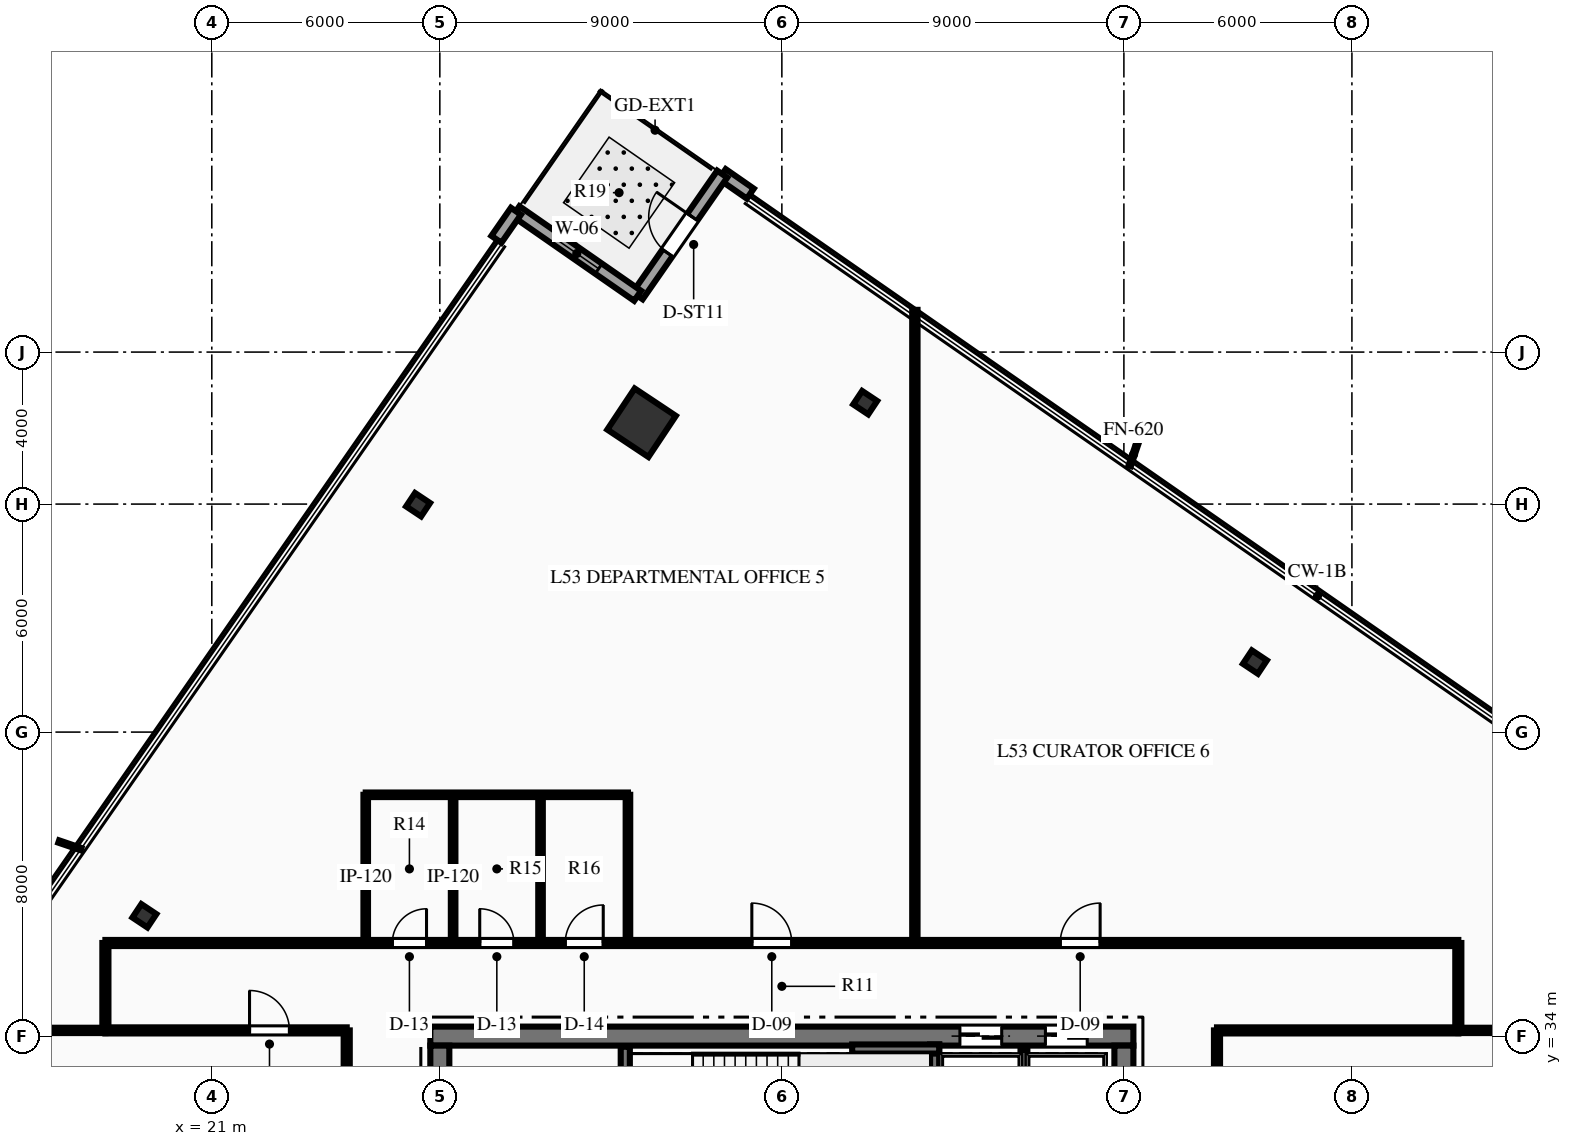
"""IFC4 building model, lengths in metres.
Left out: names, types, materials, properties, quantities, classifications, styles, units other than length and angle.
Written with IfcOpenShell. Run it as: python <this file> out.ifc"""

import sys

from ifc_helpers import new_model, si_unit, direction, frame, frame_2d, origin, origin_2d, place, context, subcontext, project, spatial, rectangle, hollow_rectangle, i_section, extrude, element, fill, save


model = new_model("IFC4")
c1 = context("Model", 3, precision=1e-05, world=origin(), true_north=direction((0.0, 1.0)))
c2 = subcontext(c1, "Body", "Model", "MODEL_VIEW")
j1 = project(units=[si_unit("LENGTHUNIT", "METRE"), si_unit("PLANEANGLEUNIT", "RADIAN")], contexts=[c1])
p1 = place(None, origin())
s1 = spatial("IfcSite", under=j1, at=p1, CompositionType="ELEMENT")
p2 = place(p1, origin())
s2 = spatial("IfcBuilding", under=s1, at=p2, CompositionType="ELEMENT")
p3 = place(p2, frame((0.0, 0.0, 213.45)))
s3 = spatial("IfcBuildingStorey", under=s2, at=p3, CompositionType="ELEMENT", Elevation=213.45)
p4 = place(p3, frame((26.75, 34.0, 0.0), z_axis=(0.0, 0.0, 1.0), x_axis=(1.0, 0.0, 0.0)))
e1 = element("IfcWall", 1, at=p4, inside=s3, PredefinedType="SHEAR", context=c2, shape_type="SweptSolid", body=[
    extrude(rectangle(XDim=18.5, YDim=0.5, at=frame_2d((9.25, 0.0))), origin(), (0.0, 0.0, 1.0), 3.75),
])
p5 = place(p4, frame((13.935, 0.0, 0.0)))
e2 = element("IfcOpeningElement", 2, at=p5, cuts=e1, PredefinedType="OPENING", context=c2, shape_type="SweptSolid", body=[
    extrude(rectangle(XDim=1.1, YDim=2.15, at=frame_2d((0.55, 1.075))), frame((0.0, 0.26, 0.0), z_axis=(0.0, -1.0, 0.0), x_axis=(1.0, 0.0, 0.0)), (0.0, 0.0, 1.0), 0.52),
])
p6 = place(p4, frame((16.185, 0.0, 0.0)))
e3 = element("IfcOpeningElement", 3, at=p6, cuts=e1, PredefinedType="OPENING", context=c2, shape_type="SweptSolid", body=[
    extrude(rectangle(XDim=1.1, YDim=2.15, at=frame_2d((0.55, 1.075))), frame((0.0, 0.26, 0.0), z_axis=(0.0, -1.0, 0.0), x_axis=(1.0, 0.0, 0.0)), (0.0, 0.0, 1.0), 0.52),
])
p7 = place(p3, frame((27.0, 18.25, 0.0), z_axis=(0.0, 0.0, 1.0), x_axis=(0.0, 1.0, 0.0)))
e4 = element("IfcWall", 4, at=p7, inside=s3, PredefinedType="SHEAR", context=c2, shape_type="SweptSolid", body=[
    extrude(rectangle(XDim=15.5, YDim=0.5, at=frame_2d((7.75, 0.0))), origin(), (0.0, 0.0, 1.0), 3.75),
])
p8 = place(p7, frame((9.99, 0.0, 0.0)))
e5 = element("IfcOpeningElement", 5, at=p8, cuts=e4, PredefinedType="OPENING", context=c2, shape_type="SweptSolid", body=[
    extrude(rectangle(XDim=1.4, YDim=2.2, at=frame_2d((0.7, 1.1))), frame((0.0, 0.26, 0.0), z_axis=(0.0, -1.0, 0.0), x_axis=(1.0, 0.0, 0.0)), (0.0, 0.0, 1.0), 0.52),
])
p9 = place(p3, frame((45.0, 18.25, 0.0), z_axis=(0.0, 0.0, 1.0), x_axis=(0.0, 1.0, 0.0)))
e6 = element("IfcWall", 6, at=p9, inside=s3, PredefinedType="SHEAR", context=c2, shape_type="SweptSolid", body=[
    extrude(rectangle(XDim=15.5, YDim=0.5, at=frame_2d((7.75, 0.0))), origin(), (0.0, 0.0, 1.0), 3.75),
])
p10 = place(p9, frame((9.99, 0.0, 0.0)))
e7 = element("IfcOpeningElement", 7, at=p10, cuts=e6, PredefinedType="OPENING", context=c2, shape_type="SweptSolid", body=[
    extrude(rectangle(XDim=1.4, YDim=2.2, at=frame_2d((0.7, 1.1))), frame((0.0, 0.26, 0.0), z_axis=(0.0, -1.0, 0.0), x_axis=(1.0, 0.0, 0.0)), (0.0, 0.0, 1.0), 0.52),
])
p11 = place(p3, frame((31.88, 29.93, 0.0), z_axis=(0.0, 0.0, 1.0), x_axis=(0.0, 1.0, 0.0)))
e8 = element("IfcWall", 8, at=p11, inside=s3, PredefinedType="SHEAR", context=c2, shape_type="SweptSolid", body=[
    extrude(rectangle(XDim=3.79, YDim=0.24, at=frame_2d((1.895, 0.0))), origin(), (0.0, 0.0, 1.0), 3.75),
])
p12 = place(p3, frame((40.02, 29.93, 0.0), z_axis=(0.0, 0.0, 1.0), x_axis=(0.0, 1.0, 0.0)))
e9 = element("IfcWall", 9, at=p12, inside=s3, PredefinedType="SHEAR", context=c2, shape_type="SweptSolid", body=[
    extrude(rectangle(XDim=3.85, YDim=0.24, at=frame_2d((1.925, 0.0))), origin(), (0.0, 0.0, 1.0), 3.75),
])
p13 = place(p3, frame((37.85, 33.66, 0.0), z_axis=(0.0, 0.0, 1.0), x_axis=(1.0, 0.0, 0.0)))
e10 = element("IfcWall", 10, at=p13, inside=s3, PredefinedType="SHEAR", context=c2, shape_type="SweptSolid", body=[
    extrude(rectangle(XDim=2.29, YDim=0.24, at=frame_2d((1.145, 0.0))), origin(), (0.0, 0.0, 1.0), 3.75),
])
p14 = place(p3, frame((32.308, 50.141, 0.0), z_axis=(0.0, 0.0, 1.0), x_axis=(0.554118199338, 0.832437998389, 0.0)))
e11 = element("IfcColumn", 11, at=p14, inside=s3, PredefinedType="COLUMN", context=c2, shape_type="SweptSolid", body=[
    extrude(hollow_rectangle(XDim=1.3, YDim=1.3, WallThickness=0.06, at=origin_2d()), origin(), (0.0, 0.0, 1.0), 3.75),
])
for number, where, z_axis, x_axis in (
    (12, (48.448, 43.842, 0.0), (0.0, 0.0, 1.0), (0.554, 0.832, 0.0)),
    (13, (38.193, 50.668, 0.0), (0.0, 0.0, 1.0), (0.554, 0.832, 0.0)),
    (14, (26.428, 47.984, 0.0), (0.0, 0.0, 1.0), (0.554, 0.832, 0.0)),
    (15, (19.226, 37.166, 0.0), (0.0, 0.0, 1.0), (0.554, 0.832, 0.0)),
):
    element("IfcColumn", number, at=place(p3, frame(where, z_axis=z_axis, x_axis=x_axis)), inside=s3, PredefinedType="COLUMN", context=c2, shape_type="SweptSolid", body=[
        extrude(i_section(OverallWidth=0.424, OverallDepth=0.474, WebThickness=0.048, FlangeThickness=0.077, at=origin_2d()), origin(), (0.0, 0.0, 1.0), 3.75),
    ])
p15 = place(p3, frame((34.431, 56.683, 0.0), z_axis=(0.0, 0.0, 1.0), x_axis=(0.821126300875, -0.570746526938, 0.0)))
e16 = element("IfcWall", 16, at=p15, inside=s3, PredefinedType="STANDARD", context=c2, shape_type="SweptSolid", body=[
    extrude(rectangle(XDim=0.9, YDim=0.32, at=frame_2d((0.45, 0.0))), origin(), (0.0, 0.0, 1.0), 3.47),
])
p16 = place(p3, frame((32.205, 53.481, 0.0), z_axis=(0.0, 0.0, 1.0), x_axis=(0.570690245506, 0.821165417979, 0.0)))
e17 = element("IfcWall", 17, at=p16, inside=s3, PredefinedType="STANDARD", context=c2, shape_type="SweptSolid", body=[
    extrude(rectangle(XDim=3.9, YDim=0.32, at=frame_2d((1.95, 0.0))), origin(), (0.0, 0.0, 1.0), 3.47),
])
p17 = place(p16, frame((1.375, 0.0, 0.0)))
e18 = element("IfcOpeningElement", 18, at=p17, cuts=e17, PredefinedType="OPENING", context=c2, shape_type="SweptSolid", body=[
    extrude(rectangle(XDim=1.15, YDim=2.2, at=frame_2d((0.575, 1.1))), frame((0.0, 0.17, 0.0), z_axis=(0.0, -1.0, 0.0), x_axis=(1.0, 0.0, 0.0)), (0.0, 0.0, 1.0), 0.34),
])
p18 = place(p3, frame((29.002, 55.707, 0.0), z_axis=(0.0, 0.0, 1.0), x_axis=(0.821185805459, -0.57066090887, 0.0)))
e19 = element("IfcWall", 19, at=p18, inside=s3, PredefinedType="STANDARD", context=c2, shape_type="SweptSolid", body=[
    extrude(rectangle(XDim=3.9, YDim=0.32, at=frame_2d((1.95, 0.0))), origin(), (0.0, 0.0, 1.0), 3.47),
])
p19 = place(p18, frame((1.25, 0.0, 0.85)))
e20 = element("IfcOpeningElement", 20, at=p19, cuts=e19, PredefinedType="OPENING", context=c2, shape_type="SweptSolid", body=[
    extrude(rectangle(XDim=1.4, YDim=2.0, at=frame_2d((0.7, 1.0))), frame((0.0, 0.17, 0.0), z_axis=(0.0, -1.0, 0.0), x_axis=(1.0, 0.0, 0.0)), (0.0, 0.0, 1.0), 0.34),
])
p20 = place(p3, frame((28.489, 54.968, 0.0), z_axis=(0.0, 0.0, 1.0), x_axis=(0.570563582873, 0.821253430982, 0.0)))
e21 = element("IfcWall", 21, at=p20, inside=s3, PredefinedType="STANDARD", context=c2, shape_type="SweptSolid", body=[
    extrude(rectangle(XDim=0.9, YDim=0.32, at=frame_2d((0.45, 0.0))), origin(), (0.0, 0.0, 1.0), 3.47),
])
p21 = place(p3, frame((42.37, 29.9, 0.0), z_axis=(0.0, 0.0, 1.0), x_axis=(0.0, 1.0, 0.0)))
e22 = element("IfcWall", 22, at=p21, inside=s3, PredefinedType="PARTITIONING", context=c2, shape_type="SweptSolid", body=[
    extrude(rectangle(XDim=3.75, YDim=0.18, at=frame_2d((1.875, 0.0))), origin(), (0.0, 0.0, 1.0), 3.47),
])
p22 = place(p3, frame((18.2, 36.45, 0.0), z_axis=(0.0, 0.0, 1.0), x_axis=(1.0, 0.0, 0.0)))
e23 = element("IfcWall", 23, at=p22, inside=s3, PredefinedType="PARTITIONING", context=c2, shape_type="SweptSolid", body=[
    extrude(rectangle(XDim=35.6, YDim=0.16, at=frame_2d((17.8, 0.0))), origin(), (0.0, 0.0, 1.0), 2.849),
])
p23 = place(p22, frame((7.55, 0.0, 0.0)))
e24 = element("IfcOpeningElement", 24, at=p23, cuts=e23, PredefinedType="OPENING", context=c2, shape_type="SweptSolid", body=[
    extrude(rectangle(XDim=0.9, YDim=2.15, at=frame_2d((0.45, 1.075))), frame((0.0, 0.09, 0.0), z_axis=(0.0, -1.0, 0.0), x_axis=(1.0, 0.0, 0.0)), (0.0, 0.0, 1.0), 0.18),
])
p24 = place(p22, frame((9.85, 0.0, 0.0)))
e25 = element("IfcOpeningElement", 25, at=p24, cuts=e23, PredefinedType="OPENING", context=c2, shape_type="SweptSolid", body=[
    extrude(rectangle(XDim=0.9, YDim=2.15, at=frame_2d((0.45, 1.075))), frame((0.0, 0.09, 0.0), z_axis=(0.0, -1.0, 0.0), x_axis=(1.0, 0.0, 0.0)), (0.0, 0.0, 1.0), 0.18),
])
p25 = place(p22, frame((12.1, 0.0, 0.0)))
e26 = element("IfcOpeningElement", 26, at=p25, cuts=e23, PredefinedType="OPENING", context=c2, shape_type="SweptSolid", body=[
    extrude(rectangle(XDim=1.0, YDim=2.15, at=frame_2d((0.5, 1.075))), frame((0.0, 0.09, 0.0), z_axis=(0.0, -1.0, 0.0), x_axis=(1.0, 0.0, 0.0)), (0.0, 0.0, 1.0), 0.18),
])
p26 = place(p22, frame((17.01, 0.0, 0.0)))
e27 = element("IfcOpeningElement", 27, at=p26, cuts=e23, PredefinedType="OPENING", context=c2, shape_type="SweptSolid", body=[
    extrude(rectangle(XDim=1.05, YDim=2.15, at=frame_2d((0.525, 1.075))), frame((0.0, 0.09, 0.0), z_axis=(0.0, -1.0, 0.0), x_axis=(1.0, 0.0, 0.0)), (0.0, 0.0, 1.0), 0.18),
])
p27 = place(p22, frame((25.125, 0.0, 0.0)))
e28 = element("IfcOpeningElement", 28, at=p27, cuts=e23, PredefinedType="OPENING", context=c2, shape_type="SweptSolid", body=[
    extrude(rectangle(XDim=1.05, YDim=2.15, at=frame_2d((0.525, 1.075))), frame((0.0, 0.09, 0.0), z_axis=(0.0, -1.0, 0.0), x_axis=(1.0, 0.0, 0.0)), (0.0, 0.0, 1.0), 0.18),
])
p28 = place(p3, frame((18.2, 34.15, 0.0), z_axis=(0.0, 0.0, 1.0), x_axis=(1.0, 0.0, 0.0)))
e29 = element("IfcWall", 29, at=p28, inside=s3, PredefinedType="PARTITIONING", context=c2, shape_type="SweptSolid", body=[
    extrude(rectangle(XDim=6.35, YDim=0.16, at=frame_2d((3.175, 0.0))), origin(), (0.0, 0.0, 1.0), 3.47),
])
p29 = place(p28, frame((3.793, 0.0, 0.0)))
e30 = element("IfcOpeningElement", 30, at=p29, cuts=e29, PredefinedType="OPENING", context=c2, shape_type="SweptSolid", body=[
    extrude(rectangle(XDim=1.05, YDim=2.15, at=frame_2d((0.525, 1.075))), frame((0.0, 0.09, 0.0), z_axis=(0.0, -1.0, 0.0), x_axis=(1.0, 0.0, 0.0)), (0.0, 0.0, 1.0), 0.18),
])
p30 = place(p3, frame((47.45, 34.15, 0.0), z_axis=(0.0, 0.0, 1.0), x_axis=(1.0, 0.0, 0.0)))
e31 = element("IfcWall", 31, at=p30, inside=s3, PredefinedType="PARTITIONING", context=c2, shape_type="SweptSolid", body=[
    extrude(rectangle(XDim=6.35, YDim=0.16, at=frame_2d((3.175, 0.0))), origin(), (0.0, 0.0, 1.0), 3.47),
])
p31 = place(p3, frame((24.55, 17.85, 0.0), z_axis=(0.0, 0.0, 1.0), x_axis=(0.0, 1.0, 0.0)))
e32 = element("IfcWall", 32, at=p31, inside=s3, PredefinedType="PARTITIONING", context=c2, shape_type="SweptSolid", body=[
    extrude(rectangle(XDim=16.3, YDim=0.16, at=frame_2d((8.15, 0.0))), origin(), (0.0, 0.0, 1.0), 3.47),
])
p32 = place(p31, frame((5.395, 0.0, 0.0)))
e33 = element("IfcOpeningElement", 33, at=p32, cuts=e32, PredefinedType="OPENING", context=c2, shape_type="SweptSolid", body=[
    extrude(rectangle(XDim=1.05, YDim=2.15, at=frame_2d((0.525, 1.075))), frame((0.0, 0.09, 0.0), z_axis=(0.0, -1.0, 0.0), x_axis=(1.0, 0.0, 0.0)), (0.0, 0.0, 1.0), 0.18),
])
p33 = place(p3, frame((47.45, 27.25, 0.0), z_axis=(0.0, 0.0, 1.0), x_axis=(0.0, 1.0, 0.0)))
e34 = element("IfcWall", 34, at=p33, inside=s3, PredefinedType="PARTITIONING", context=c2, shape_type="SweptSolid", body=[
    extrude(rectangle(XDim=6.9, YDim=0.16, at=frame_2d((3.45, 0.0))), origin(), (0.0, 0.0, 1.0), 3.47),
])
p34 = place(p33, frame((1.683, 0.0, 0.0)))
e35 = element("IfcOpeningElement", 35, at=p34, cuts=e34, PredefinedType="OPENING", context=c2, shape_type="SweptSolid", body=[
    extrude(rectangle(XDim=1.05, YDim=2.15, at=frame_2d((0.525, 1.075))), frame((0.0, 0.09, 0.0), z_axis=(0.0, -1.0, 0.0), x_axis=(1.0, 0.0, 0.0)), (0.0, 0.0, 1.0), 0.18),
])
for number, where, z_axis, x_axis in (
    (36, (18.2, 34.15, 0.0), (0.0, 0.0, 1.0), (0.0, 1.0, 0.0)),
    (37, (53.8, 34.15, 0.0), (0.0, 0.0, 1.0), (0.0, 1.0, 0.0)),
):
    element("IfcWall", number, at=place(p3, frame(where, z_axis=z_axis, x_axis=x_axis)), inside=s3, PredefinedType="PARTITIONING", context=c2, shape_type="SweptSolid", body=[
        extrude(rectangle(XDim=2.3, YDim=0.16, at=frame_2d((1.15, 0.0))), origin(), (0.0, 0.0, 1.0), 3.47),
    ])
for number, where, z_axis, x_axis in (
    (38, (25.05, 36.45, 0.0), (0.0, 0.0, 1.0), (0.0, 1.0, 0.0)),
    (39, (27.35, 36.45, 0.0), (0.0, 0.0, 1.0), (0.0, 1.0, 0.0)),
    (40, (29.65, 36.45, 0.0), (0.0, 0.0, 1.0), (0.0, 1.0, 0.0)),
):
    element("IfcWall", number, at=place(p3, frame(where, z_axis=z_axis, x_axis=x_axis)), inside=s3, PredefinedType="PARTITIONING", context=c2, shape_type="SweptSolid", body=[
        extrude(rectangle(XDim=3.9, YDim=0.12, at=frame_2d((1.95, 0.0))), origin(), (0.0, 0.0, 1.0), 3.47),
    ])
p35 = place(p3, frame((31.95, 36.45, 0.0), z_axis=(0.0, 0.0, 1.0), x_axis=(0.0, 1.0, 0.0)))
e41 = element("IfcWall", 41, at=p35, inside=s3, PredefinedType="PARTITIONING", context=c2, shape_type="SweptSolid", body=[
    extrude(rectangle(XDim=3.9, YDim=0.12, at=frame_2d((1.95, 0.0))), origin(), (0.0, 0.0, 1.0), 2.849),
])
p36 = place(p3, frame((25.05, 40.35, 0.0), z_axis=(0.0, 0.0, 1.0), x_axis=(1.0, 0.0, 0.0)))
e42 = element("IfcWall", 42, at=p36, inside=s3, PredefinedType="PARTITIONING", context=c2, shape_type="SweptSolid", body=[
    extrude(rectangle(XDim=6.9, YDim=0.12, at=frame_2d((3.45, 0.0))), origin(), (0.0, 0.0, 1.0), 3.47),
])
p37 = place(p3, frame((14.069, 34.15, 0.0), z_axis=(0.0, 0.0, 1.0), x_axis=(1.0, 0.0, 0.0)))
e43 = element("IfcWall", 43, at=p37, inside=s3, PredefinedType="PARTITIONING", context=c2, shape_type="SweptSolid", body=[
    extrude(rectangle(XDim=4.131, YDim=0.14, at=frame_2d((2.065, 0.0))), origin(), (0.0, 0.0, 1.0), 3.47),
])
p38 = place(p3, frame((53.8, 34.15, 0.0), z_axis=(0.0, 0.0, 1.0), x_axis=(1.0, 0.0, 0.0)))
e44 = element("IfcWall", 44, at=p38, inside=s3, PredefinedType="PARTITIONING", context=c2, shape_type="SweptSolid", body=[
    extrude(rectangle(XDim=11.685, YDim=0.14, at=frame_2d((5.842, 0.0))), origin(), (0.0, 0.0, 1.0), 3.47),
])
p39 = place(p3, frame((39.5, 36.45, 0.0), z_axis=(0.0, 0.0, 1.0), x_axis=(0.0, 1.0, 0.0)))
e45 = element("IfcWall", 45, at=p39, inside=s3, PredefinedType="PARTITIONING", context=c2, shape_type="SweptSolid", body=[
    extrude(rectangle(XDim=16.661, YDim=0.14, at=frame_2d((8.331, 0.0))), origin(), (0.0, 0.0, 1.0), 3.47),
])
p40 = place(p17, origin())
e46 = element("IfcDoor", 46, at=p40, inside=s3, OperationType="SINGLE_SWING_RIGHT", PredefinedType="DOOR", context=c2, shape_type="SweptSolid", body=[
    extrude(rectangle(XDim=1.15, YDim=2.2, at=frame_2d((0.575, 1.1))), frame((0.0, 0.025, 0.0), z_axis=(0.0, -1.0, 0.0), x_axis=(1.0, 0.0, 0.0)), (0.0, 0.0, 1.0), 0.05),
])
fill(e18, e46)
p41 = place(p19, origin())
e47 = element("IfcWindow", 47, at=p41, inside=s3, PartitioningType="SINGLE_PANEL", PredefinedType="WINDOW", context=c2, shape_type="SweptSolid", body=[
    extrude(rectangle(XDim=1.4, YDim=2.0, at=frame_2d((0.7, 1.0))), frame((0.0, 0.03, 0.0), z_axis=(0.0, -1.0, 0.0), x_axis=(1.0, 0.0, 0.0)), (0.0, 0.0, 1.0), 0.06),
])
fill(e20, e47)
p42 = place(p23, origin())
e48 = element("IfcDoor", 48, at=p42, inside=s3, OperationType="SINGLE_SWING_RIGHT", PredefinedType="DOOR", context=c2, shape_type="SweptSolid", body=[
    extrude(rectangle(XDim=0.9, YDim=2.15, at=frame_2d((0.45, 1.075))), frame((0.0, 0.025, 0.0), z_axis=(0.0, -1.0, 0.0), x_axis=(1.0, 0.0, 0.0)), (0.0, 0.0, 1.0), 0.05),
])
fill(e24, e48)
p43 = place(p24, origin())
e49 = element("IfcDoor", 49, at=p43, inside=s3, OperationType="SINGLE_SWING_LEFT", PredefinedType="DOOR", context=c2, shape_type="SweptSolid", body=[
    extrude(rectangle(XDim=0.9, YDim=2.15, at=frame_2d((0.45, 1.075))), frame((0.0, 0.025, 0.0), z_axis=(0.0, -1.0, 0.0), x_axis=(1.0, 0.0, 0.0)), (0.0, 0.0, 1.0), 0.05),
])
fill(e25, e49)
p44 = place(p25, origin())
e50 = element("IfcDoor", 50, at=p44, inside=s3, OperationType="SINGLE_SWING_RIGHT", PredefinedType="DOOR", context=c2, shape_type="SweptSolid", body=[
    extrude(rectangle(XDim=1.0, YDim=2.15, at=frame_2d((0.5, 1.075))), frame((0.0, 0.025, 0.0), z_axis=(0.0, -1.0, 0.0), x_axis=(1.0, 0.0, 0.0)), (0.0, 0.0, 1.0), 0.05),
])
fill(e26, e50)
p45 = place(p26, origin())
e51 = element("IfcDoor", 51, at=p45, inside=s3, OperationType="SINGLE_SWING_LEFT", PredefinedType="DOOR", context=c2, shape_type="SweptSolid", body=[
    extrude(rectangle(XDim=1.05, YDim=2.15, at=frame_2d((0.525, 1.075))), frame((0.0, 0.025, 0.0), z_axis=(0.0, -1.0, 0.0), x_axis=(1.0, 0.0, 0.0)), (0.0, 0.0, 1.0), 0.05),
])
fill(e27, e51)
p46 = place(p27, origin())
e52 = element("IfcDoor", 52, at=p46, inside=s3, OperationType="SINGLE_SWING_RIGHT", PredefinedType="DOOR", context=c2, shape_type="SweptSolid", body=[
    extrude(rectangle(XDim=1.05, YDim=2.15, at=frame_2d((0.525, 1.075))), frame((0.0, 0.025, 0.0), z_axis=(0.0, -1.0, 0.0), x_axis=(1.0, 0.0, 0.0)), (0.0, 0.0, 1.0), 0.05),
])
fill(e28, e52)
p47 = place(p29, origin())
e53 = element("IfcDoor", 53, at=p47, inside=s3, OperationType="SINGLE_SWING_LEFT", PredefinedType="DOOR", context=c2, shape_type="SweptSolid", body=[
    extrude(rectangle(XDim=1.05, YDim=2.15, at=frame_2d((0.525, 1.075))), frame((0.0, 0.025, 0.0), z_axis=(0.0, -1.0, 0.0), x_axis=(1.0, 0.0, 0.0)), (0.0, 0.0, 1.0), 0.05),
])
fill(e30, e53)
p48 = place(p5, origin())
e54 = element("IfcDoor", 54, at=p48, inside=s3, OperationType="SLIDING_TO_LEFT", PredefinedType="DOOR", context=c2, shape_type="SweptSolid", body=[
    extrude(rectangle(XDim=1.1, YDim=2.15, at=frame_2d((0.55, 1.075))), frame((0.0, 0.025, 0.0), z_axis=(0.0, -1.0, 0.0), x_axis=(1.0, 0.0, 0.0)), (0.0, 0.0, 1.0), 0.05),
])
fill(e2, e54)
p49 = place(p6, origin())
e55 = element("IfcDoor", 55, at=p49, inside=s3, OperationType="SLIDING_TO_LEFT", PredefinedType="DOOR", context=c2, shape_type="SweptSolid", body=[
    extrude(rectangle(XDim=1.1, YDim=2.15, at=frame_2d((0.55, 1.075))), frame((0.0, 0.025, 0.0), z_axis=(0.0, -1.0, 0.0), x_axis=(1.0, 0.0, 0.0)), (0.0, 0.0, 1.0), 0.05),
])
fill(e3, e55)
save(model, sys.argv[1])
